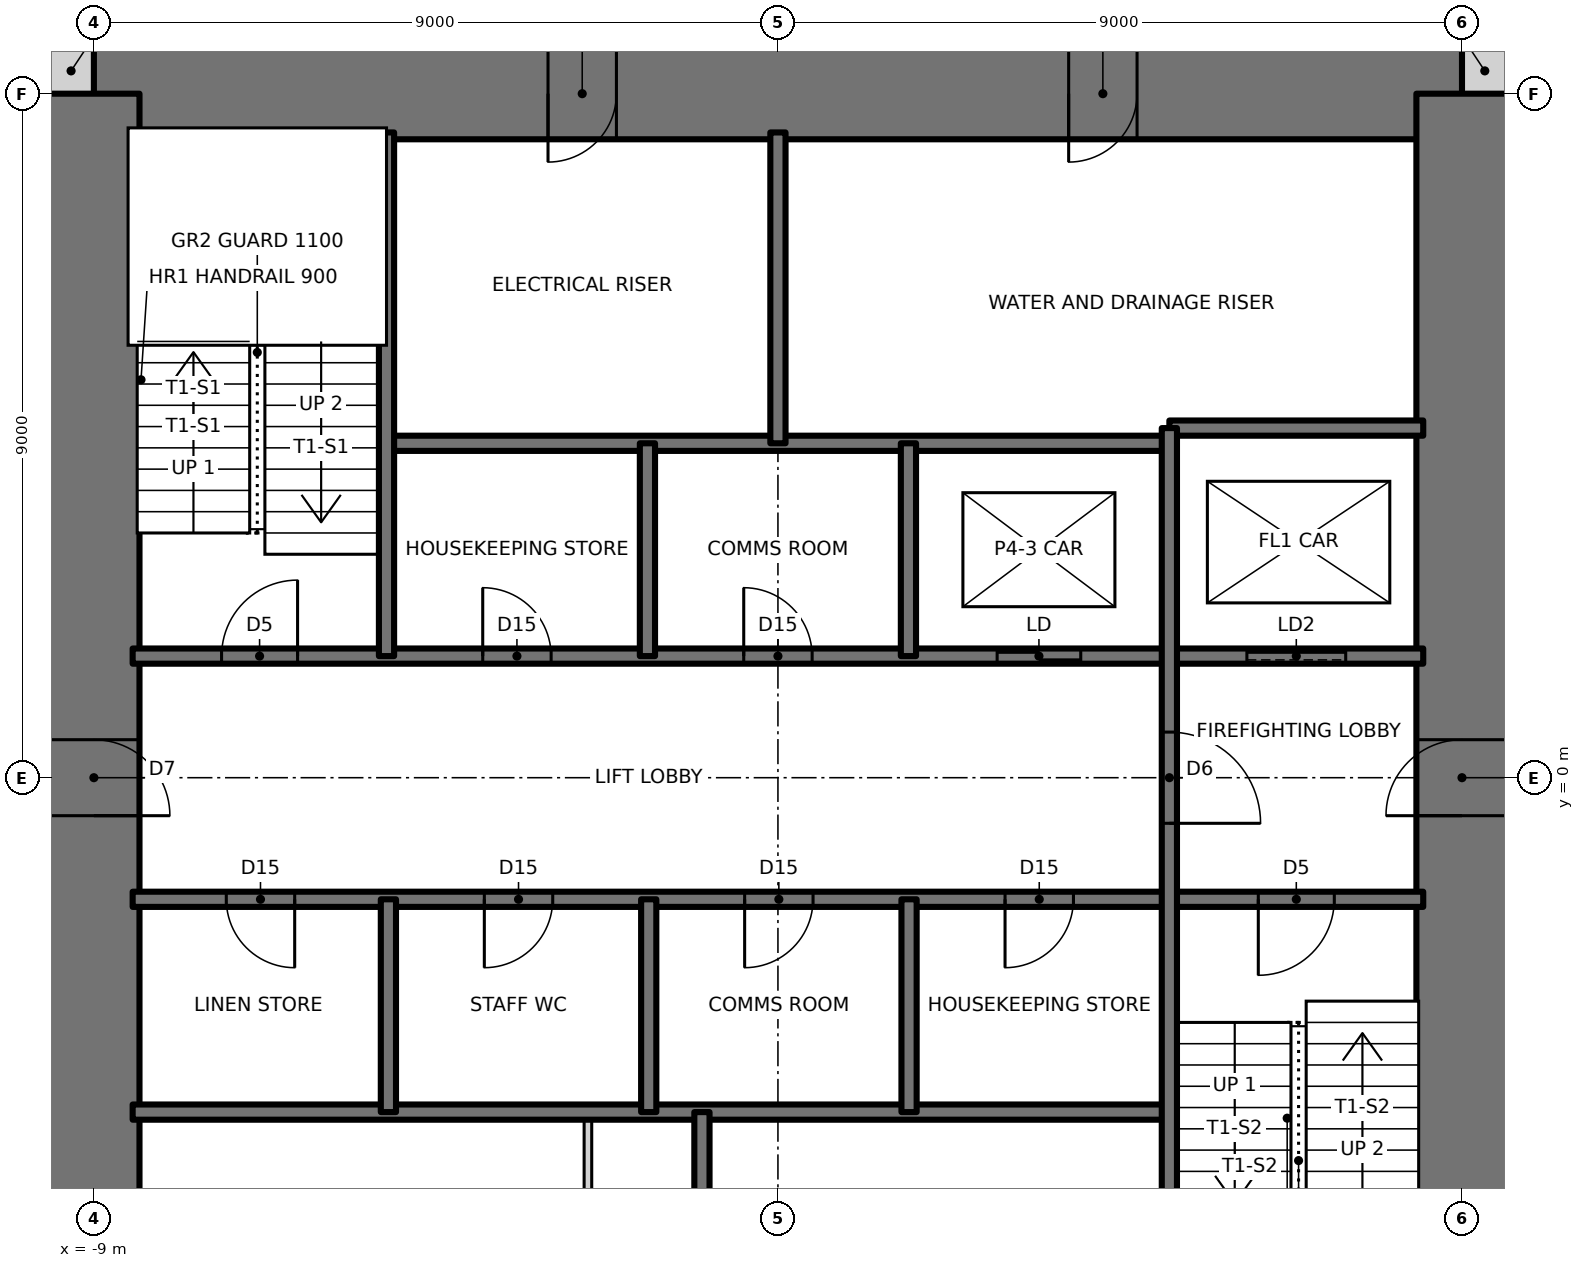
"""IFC4 building model, lengths in metres.
Left out: names, types, materials, properties, quantities, classifications, styles, units other than length and angle.
Written with IfcOpenShell. Run it as: python <this file> out.ifc"""

import sys

from ifc_helpers import new_model, si_unit, direction, frame, frame_2d, origin, place, context, subcontext, project, spatial, rectangle, extrude, element, fill, save


model = new_model("IFC4")
c1 = context("Model", 3, precision=1e-05, world=origin(), true_north=direction((0.0, 1.0)))
c2 = subcontext(c1, "Body", "Model", "MODEL_VIEW")
j1 = project(units=[si_unit("LENGTHUNIT", "METRE"), si_unit("PLANEANGLEUNIT", "RADIAN")], contexts=[c1])
p1 = place(None, origin())
s1 = spatial("IfcSite", under=j1, at=p1, CompositionType="ELEMENT")
p2 = place(p1, origin())
s2 = spatial("IfcBuilding", under=s1, at=p2, CompositionType="ELEMENT")
p3 = place(p2, frame((0.0, 0.0, 222.0)))
s3 = spatial("IfcBuildingStorey", under=s2, at=p3, CompositionType="ELEMENT", Elevation=222.0)
for number, where, z_axis, x_axis in (
    (1, (9.0, 9.3, 0.0), (0.0, 0.0, 1.0), (1.0, 0.0, 0.0)),
    (2, (-9.6, 9.3, 0.0), (0.0, 0.0, 1.0), (1.0, 0.0, 0.0)),
):
    element("IfcWall", number, at=place(p3, frame(where, z_axis=z_axis, x_axis=x_axis)), inside=s3, PredefinedType="SOLIDWALL", context=c2, shape_type="SweptSolid", body=[
        extrude(rectangle(XDim=0.6, YDim=0.6, at=frame_2d((0.3, 0.0))), origin(), (0.0, 0.0, 1.0), 3.5),
    ])
p4 = place(p3, frame((9.0, 9.0, 0.0), z_axis=(0.0, 0.0, 1.0), x_axis=(-1.0, 0.0, 0.0)))
e3 = element("IfcWall", 3, at=p4, inside=s3, PredefinedType="SHEAR", context=c2, shape_type="SweptSolid", body=[
    extrude(rectangle(XDim=18.0, YDim=1.2, at=frame_2d((9.0, 0.0))), origin(), (0.0, 0.0, 1.0), 3.5),
])
p5 = place(p4, frame((11.125, 0.0, 0.0)))
e4 = element("IfcOpeningElement", 4, at=p5, cuts=e3, PredefinedType="OPENING", context=c2, shape_type="SweptSolid", body=[
    extrude(rectangle(XDim=0.9, YDim=2.1, at=frame_2d((0.45, 1.05))), frame((0.0, 0.61, 0.0), z_axis=(0.0, -1.0, 0.0), x_axis=(1.0, 0.0, 0.0)), (0.0, 0.0, 1.0), 1.22),
])
p6 = place(p4, frame((4.275, 0.0, 0.0)))
e5 = element("IfcOpeningElement", 5, at=p6, cuts=e3, PredefinedType="OPENING", context=c2, shape_type="SweptSolid", body=[
    extrude(rectangle(XDim=0.9, YDim=2.1, at=frame_2d((0.45, 1.05))), frame((0.0, 0.61, 0.0), z_axis=(0.0, -1.0, 0.0), x_axis=(1.0, 0.0, 0.0)), (0.0, 0.0, 1.0), 1.22),
])
p7 = place(p3, frame((9.0, -9.0, 0.0), z_axis=(0.0, 0.0, 1.0), x_axis=(0.0, 1.0, 0.0)))
e6 = element("IfcWall", 6, at=p7, inside=s3, PredefinedType="SHEAR", context=c2, shape_type="SweptSolid", body=[
    extrude(rectangle(XDim=18.0, YDim=1.2, at=frame_2d((9.0, 0.0))), origin(), (0.0, 0.0, 1.0), 3.5),
])
p8 = place(p7, frame((8.5, 0.0, 0.0)))
e7 = element("IfcOpeningElement", 7, at=p8, cuts=e6, PredefinedType="OPENING", context=c2, shape_type="SweptSolid", body=[
    extrude(rectangle(XDim=1.0, YDim=2.1, at=frame_2d((0.5, 1.05))), frame((0.0, 0.61, 0.0), z_axis=(0.0, -1.0, 0.0), x_axis=(1.0, 0.0, 0.0)), (0.0, 0.0, 1.0), 1.22),
])
p9 = place(p3, frame((-9.0, 9.0, 0.0), z_axis=(0.0, 0.0, 1.0), x_axis=(0.0, -1.0, 0.0)))
e8 = element("IfcWall", 8, at=p9, inside=s3, PredefinedType="SHEAR", context=c2, shape_type="SweptSolid", body=[
    extrude(rectangle(XDim=18.0, YDim=1.2, at=frame_2d((9.0, 0.0))), origin(), (0.0, 0.0, 1.0), 3.5),
])
p10 = place(p9, frame((8.5, 0.0, 0.0)))
e9 = element("IfcOpeningElement", 9, at=p10, cuts=e8, PredefinedType="OPENING", context=c2, shape_type="SweptSolid", body=[
    extrude(rectangle(XDim=1.0, YDim=2.1, at=frame_2d((0.5, 1.05))), frame((0.0, 0.61, 0.0), z_axis=(0.0, -1.0, 0.0), x_axis=(1.0, 0.0, 0.0)), (0.0, 0.0, 1.0), 1.22),
])
p11 = place(p3, frame((-8.49, -4.4, 0.0), z_axis=(0.0, 0.0, 1.0), x_axis=(1.0, 0.0, 0.0)))
e10 = element("IfcWall", 10, at=p11, inside=s3, PredefinedType="SOLIDWALL", context=c2, shape_type="SweptSolid", body=[
    extrude(rectangle(XDim=13.64, YDim=0.2, at=frame_2d((6.82, 0.0))), origin(), (0.0, 0.0, 1.0), 3.5),
])
p12 = place(p3, frame((-8.49, -1.6, 0.0), z_axis=(0.0, 0.0, 1.0), x_axis=(1.0, 0.0, 0.0)))
e11 = element("IfcWall", 11, at=p12, inside=s3, PredefinedType="SOLIDWALL", context=c2, shape_type="SweptSolid", body=[
    extrude(rectangle(XDim=16.98, YDim=0.2, at=frame_2d((8.49, 0.0))), origin(), (0.0, 0.0, 1.0), 3.5),
])
p13 = place(p12, frame((14.81, 0.0, 0.0)))
e12 = element("IfcOpeningElement", 12, at=p13, cuts=e11, PredefinedType="OPENING", context=c2, shape_type="SweptSolid", body=[
    extrude(rectangle(XDim=1.0, YDim=2.1, at=frame_2d((0.5, 1.05))), frame((0.0, 0.11, 0.0), z_axis=(0.0, -1.0, 0.0), x_axis=(1.0, 0.0, 0.0)), (0.0, 0.0, 1.0), 0.22),
])
p14 = place(p12, frame((1.232, 0.0, 0.0)))
e13 = element("IfcOpeningElement", 13, at=p14, cuts=e11, PredefinedType="OPENING", context=c2, shape_type="SweptSolid", body=[
    extrude(rectangle(XDim=0.9, YDim=2.1, at=frame_2d((0.45, 1.05))), frame((0.0, 0.11, 0.0), z_axis=(0.0, -1.0, 0.0), x_axis=(1.0, 0.0, 0.0)), (0.0, 0.0, 1.0), 0.22),
])
p15 = place(p12, frame((4.627, 0.0, 0.0)))
e14 = element("IfcOpeningElement", 14, at=p15, cuts=e11, PredefinedType="OPENING", context=c2, shape_type="SweptSolid", body=[
    extrude(rectangle(XDim=0.9, YDim=2.1, at=frame_2d((0.45, 1.05))), frame((0.0, 0.11, 0.0), z_axis=(0.0, -1.0, 0.0), x_axis=(1.0, 0.0, 0.0)), (0.0, 0.0, 1.0), 0.22),
])
p16 = place(p12, frame((8.052, 0.0, 0.0)))
e15 = element("IfcOpeningElement", 15, at=p16, cuts=e11, PredefinedType="OPENING", context=c2, shape_type="SweptSolid", body=[
    extrude(rectangle(XDim=0.9, YDim=2.1, at=frame_2d((0.45, 1.05))), frame((0.0, 0.11, 0.0), z_axis=(0.0, -1.0, 0.0), x_axis=(1.0, 0.0, 0.0)), (0.0, 0.0, 1.0), 0.22),
])
p17 = place(p12, frame((11.478, 0.0, 0.0)))
e16 = element("IfcOpeningElement", 16, at=p17, cuts=e11, PredefinedType="OPENING", context=c2, shape_type="SweptSolid", body=[
    extrude(rectangle(XDim=0.9, YDim=2.1, at=frame_2d((0.45, 1.05))), frame((0.0, 0.11, 0.0), z_axis=(0.0, -1.0, 0.0), x_axis=(1.0, 0.0, 0.0)), (0.0, 0.0, 1.0), 0.22),
])
p18 = place(p3, frame((-8.49, 1.6, 0.0), z_axis=(0.0, 0.0, 1.0), x_axis=(1.0, 0.0, 0.0)))
e17 = element("IfcWall", 17, at=p18, inside=s3, PredefinedType="SOLIDWALL", context=c2, shape_type="SweptSolid", body=[
    extrude(rectangle(XDim=16.98, YDim=0.2, at=frame_2d((8.49, 0.0))), origin(), (0.0, 0.0, 1.0), 3.5),
])
p19 = place(p18, frame((1.17, 0.0, 0.0)))
e18 = element("IfcOpeningElement", 18, at=p19, cuts=e17, PredefinedType="OPENING", context=c2, shape_type="SweptSolid", body=[
    extrude(rectangle(XDim=1.0, YDim=2.1, at=frame_2d((0.5, 1.05))), frame((0.0, 0.11, 0.0), z_axis=(0.0, -1.0, 0.0), x_axis=(1.0, 0.0, 0.0)), (0.0, 0.0, 1.0), 0.22),
])
p20 = place(p18, frame((4.606, 0.0, 0.0)))
e19 = element("IfcOpeningElement", 19, at=p20, cuts=e17, PredefinedType="OPENING", context=c2, shape_type="SweptSolid", body=[
    extrude(rectangle(XDim=0.9, YDim=2.1, at=frame_2d((0.45, 1.05))), frame((0.0, 0.11, 0.0), z_axis=(0.0, -1.0, 0.0), x_axis=(1.0, 0.0, 0.0)), (0.0, 0.0, 1.0), 0.22),
])
p21 = place(p18, frame((8.04, 0.0, 0.0)))
e20 = element("IfcOpeningElement", 20, at=p21, cuts=e17, PredefinedType="OPENING", context=c2, shape_type="SweptSolid", body=[
    extrude(rectangle(XDim=0.9, YDim=2.1, at=frame_2d((0.45, 1.05))), frame((0.0, 0.11, 0.0), z_axis=(0.0, -1.0, 0.0), x_axis=(1.0, 0.0, 0.0)), (0.0, 0.0, 1.0), 0.22),
])
p22 = place(p18, frame((11.374, 0.0, 0.0)))
e21 = element("IfcOpeningElement", 21, at=p22, cuts=e17, PredefinedType="OPENING", context=c2, shape_type="SweptSolid", body=[
    extrude(rectangle(XDim=1.1, YDim=2.1, at=frame_2d((0.55, 1.05))), frame((0.0, 0.11, 0.0), z_axis=(0.0, -1.0, 0.0), x_axis=(1.0, 0.0, 0.0)), (0.0, 0.0, 1.0), 0.22),
])
p23 = place(p18, frame((14.66, 0.0, 0.0)))
e22 = element("IfcOpeningElement", 22, at=p23, cuts=e17, PredefinedType="OPENING", context=c2, shape_type="SweptSolid", body=[
    extrude(rectangle(XDim=1.3, YDim=2.1, at=frame_2d((0.65, 1.05))), frame((0.0, 0.11, 0.0), z_axis=(0.0, -1.0, 0.0), x_axis=(1.0, 0.0, 0.0)), (0.0, 0.0, 1.0), 0.22),
])
p24 = place(p3, frame((-5.15, 4.4, 0.0), z_axis=(0.0, 0.0, 1.0), x_axis=(1.0, 0.0, 0.0)))
e23 = element("IfcWall", 23, at=p24, inside=s3, PredefinedType="SOLIDWALL", context=c2, shape_type="SweptSolid", body=[
    extrude(rectangle(XDim=10.3, YDim=0.2, at=frame_2d((5.15, 0.0))), origin(), (0.0, 0.0, 1.0), 3.5),
])
p25 = place(p3, frame((5.15, 4.6, 0.0), z_axis=(0.0, 0.0, 1.0), x_axis=(1.0, 0.0, 0.0)))
e24 = element("IfcWall", 24, at=p25, inside=s3, PredefinedType="SOLIDWALL", context=c2, shape_type="SweptSolid", body=[
    extrude(rectangle(XDim=3.34, YDim=0.2, at=frame_2d((1.67, 0.0))), origin(), (0.0, 0.0, 1.0), 3.5),
])
p26 = place(p3, frame((5.15, -8.49, 0.0), z_axis=(0.0, 0.0, 1.0), x_axis=(0.0, 1.0, 0.0)))
e25 = element("IfcWall", 25, at=p26, inside=s3, PredefinedType="SOLIDWALL", context=c2, shape_type="SweptSolid", body=[
    extrude(rectangle(XDim=13.09, YDim=0.2, at=frame_2d((6.545, 0.0))), origin(), (0.0, 0.0, 1.0), 3.5),
])
p27 = place(p26, frame((7.89, 0.0, 0.0)))
e26 = element("IfcOpeningElement", 26, at=p27, cuts=e25, PredefinedType="OPENING", context=c2, shape_type="SweptSolid", body=[
    extrude(rectangle(XDim=1.2, YDim=2.1, at=frame_2d((0.6, 1.05))), frame((0.0, 0.11, 0.0), z_axis=(0.0, -1.0, 0.0), x_axis=(1.0, 0.0, 0.0)), (0.0, 0.0, 1.0), 0.22),
])
for number, where, z_axis, x_axis in (
    (27, (1.725, -4.4, 0.0), (0.0, 0.0, 1.0), (0.0, 1.0, 0.0)),
    (28, (1.717, 1.6, 0.0), (0.0, 0.0, 1.0), (0.0, 1.0, 0.0)),
):
    element("IfcWall", number, at=place(p3, frame(where, z_axis=z_axis, x_axis=x_axis)), inside=s3, PredefinedType="SOLIDWALL", context=c2, shape_type="SweptSolid", body=[
        extrude(rectangle(XDim=2.8, YDim=0.2, at=frame_2d((1.4, 0.0))), origin(), (0.0, 0.0, 1.0), 3.5),
    ])
for number, where, z_axis, x_axis in (
    (29, (0.0, 4.4, 0.0), (0.0, 0.0, 1.0), (0.0, 1.0, 0.0)),
    (30, (-1.0, -8.49, 0.0), (0.0, 0.0, 1.0), (0.0, 1.0, 0.0)),
):
    element("IfcWall", number, at=place(p3, frame(where, z_axis=z_axis, x_axis=x_axis)), inside=s3, PredefinedType="SOLIDWALL", context=c2, shape_type="SweptSolid", body=[
        extrude(rectangle(XDim=4.09, YDim=0.2, at=frame_2d((2.045, 0.0))), origin(), (0.0, 0.0, 1.0), 3.5),
    ])
for number, where, z_axis, x_axis in (
    (31, (-1.7, -4.4, 0.0), (0.0, 0.0, 1.0), (0.0, 1.0, 0.0)),
    (32, (-1.717, 1.6, 0.0), (0.0, 0.0, 1.0), (0.0, 1.0, 0.0)),
):
    element("IfcWall", number, at=place(p3, frame(where, z_axis=z_axis, x_axis=x_axis)), inside=s3, PredefinedType="SOLIDWALL", context=c2, shape_type="SweptSolid", body=[
        extrude(rectangle(XDim=2.8, YDim=0.2, at=frame_2d((1.4, 0.0))), origin(), (0.0, 0.0, 1.0), 3.5),
    ])
p28 = place(p3, frame((-2.5, -8.49, 0.0), z_axis=(0.0, 0.0, 1.0), x_axis=(0.0, 1.0, 0.0)))
e33 = element("IfcWall", 33, at=p28, inside=s3, PredefinedType="PARTITIONING", context=c2, shape_type="SweptSolid", body=[
    extrude(rectangle(XDim=4.09, YDim=0.1, at=frame_2d((2.045, 0.0))), origin(), (0.0, 0.0, 1.0), 3.3),
])
p29 = place(p28, frame((1.595, 0.0, 0.0)))
e34 = element("IfcOpeningElement", 34, at=p29, cuts=e33, PredefinedType="OPENING", context=c2, shape_type="SweptSolid", body=[
    extrude(rectangle(XDim=0.9, YDim=2.1, at=frame_2d((0.45, 1.05))), frame((0.0, 0.06, 0.0), z_axis=(0.0, -1.0, 0.0), x_axis=(1.0, 0.0, 0.0)), (0.0, 0.0, 1.0), 0.12),
])
p30 = place(p3, frame((-5.125, -4.4, 0.0), z_axis=(0.0, 0.0, 1.0), x_axis=(0.0, 1.0, 0.0)))
e35 = element("IfcWall", 35, at=p30, inside=s3, PredefinedType="SOLIDWALL", context=c2, shape_type="SweptSolid", body=[
    extrude(rectangle(XDim=2.8, YDim=0.2, at=frame_2d((1.4, 0.0))), origin(), (0.0, 0.0, 1.0), 3.5),
])
p31 = place(p3, frame((-5.15, 1.6, 0.0), z_axis=(0.0, 0.0, 1.0), x_axis=(0.0, 1.0, 0.0)))
e36 = element("IfcWall", 36, at=p31, inside=s3, PredefinedType="SOLIDWALL", context=c2, shape_type="SweptSolid", body=[
    extrude(rectangle(XDim=6.89, YDim=0.2, at=frame_2d((3.445, 0.0))), origin(), (0.0, 0.0, 1.0), 3.5),
])
p32 = place(p19, origin())
e37 = element("IfcDoor", 37, at=p32, inside=s3, OperationType="SINGLE_SWING_RIGHT", PredefinedType="DOOR", context=c2, shape_type="SweptSolid", body=[
    extrude(rectangle(XDim=1.0, YDim=2.1, at=frame_2d((0.5, 1.05))), frame((0.0, 0.025, 0.0), z_axis=(0.0, -1.0, 0.0), x_axis=(1.0, 0.0, 0.0)), (0.0, 0.0, 1.0), 0.05),
])
fill(e18, e37)
p33 = place(p13, frame((1.0, 0.0, 0.0), z_axis=(0.0, 0.0, 1.0), x_axis=(-1.0, 0.0, 0.0)))
e38 = element("IfcDoor", 38, at=p33, inside=s3, OperationType="SINGLE_SWING_RIGHT", PredefinedType="DOOR", context=c2, shape_type="SweptSolid", body=[
    extrude(rectangle(XDim=1.0, YDim=2.1, at=frame_2d((0.5, 1.05))), frame((0.0, 0.025, 0.0), z_axis=(0.0, -1.0, 0.0), x_axis=(1.0, 0.0, 0.0)), (0.0, 0.0, 1.0), 0.05),
])
fill(e12, e38)
p34 = place(p27, frame((1.2, 0.0, 0.0), z_axis=(0.0, 0.0, 1.0), x_axis=(-1.0, 0.0, 0.0)))
e39 = element("IfcDoor", 39, at=p34, inside=s3, OperationType="SINGLE_SWING_RIGHT", PredefinedType="DOOR", context=c2, shape_type="SweptSolid", body=[
    extrude(rectangle(XDim=1.2, YDim=2.1, at=frame_2d((0.6, 1.05))), frame((0.0, 0.025, 0.0), z_axis=(0.0, -1.0, 0.0), x_axis=(1.0, 0.0, 0.0)), (0.0, 0.0, 1.0), 0.05),
])
fill(e26, e39)
p35 = place(p20, origin())
e40 = element("IfcDoor", 40, at=p35, inside=s3, OperationType="SINGLE_SWING_LEFT", PredefinedType="DOOR", context=c2, shape_type="SweptSolid", body=[
    extrude(rectangle(XDim=0.9, YDim=2.1, at=frame_2d((0.45, 1.05))), frame((0.0, 0.025, 0.0), z_axis=(0.0, -1.0, 0.0), x_axis=(1.0, 0.0, 0.0)), (0.0, 0.0, 1.0), 0.05),
])
fill(e19, e40)
p36 = place(p21, origin())
e41 = element("IfcDoor", 41, at=p36, inside=s3, OperationType="SINGLE_SWING_LEFT", PredefinedType="DOOR", context=c2, shape_type="SweptSolid", body=[
    extrude(rectangle(XDim=0.9, YDim=2.1, at=frame_2d((0.45, 1.05))), frame((0.0, 0.025, 0.0), z_axis=(0.0, -1.0, 0.0), x_axis=(1.0, 0.0, 0.0)), (0.0, 0.0, 1.0), 0.05),
])
fill(e20, e41)
p37 = place(p14, frame((0.9, 0.0, 0.0), z_axis=(0.0, 0.0, 1.0), x_axis=(-1.0, 0.0, 0.0)))
e42 = element("IfcDoor", 42, at=p37, inside=s3, OperationType="SINGLE_SWING_LEFT", PredefinedType="DOOR", context=c2, shape_type="SweptSolid", body=[
    extrude(rectangle(XDim=0.9, YDim=2.1, at=frame_2d((0.45, 1.05))), frame((0.0, 0.025, 0.0), z_axis=(0.0, -1.0, 0.0), x_axis=(1.0, 0.0, 0.0)), (0.0, 0.0, 1.0), 0.05),
])
fill(e13, e42)
p38 = place(p15, frame((0.9, 0.0, 0.0), z_axis=(0.0, 0.0, 1.0), x_axis=(-1.0, 0.0, 0.0)))
e43 = element("IfcDoor", 43, at=p38, inside=s3, OperationType="SINGLE_SWING_RIGHT", PredefinedType="DOOR", context=c2, shape_type="SweptSolid", body=[
    extrude(rectangle(XDim=0.9, YDim=2.1, at=frame_2d((0.45, 1.05))), frame((0.0, 0.025, 0.0), z_axis=(0.0, -1.0, 0.0), x_axis=(1.0, 0.0, 0.0)), (0.0, 0.0, 1.0), 0.05),
])
fill(e14, e43)
p39 = place(p16, frame((0.9, 0.0, 0.0), z_axis=(0.0, 0.0, 1.0), x_axis=(-1.0, 0.0, 0.0)))
e44 = element("IfcDoor", 44, at=p39, inside=s3, OperationType="SINGLE_SWING_RIGHT", PredefinedType="DOOR", context=c2, shape_type="SweptSolid", body=[
    extrude(rectangle(XDim=0.9, YDim=2.1, at=frame_2d((0.45, 1.05))), frame((0.0, 0.025, 0.0), z_axis=(0.0, -1.0, 0.0), x_axis=(1.0, 0.0, 0.0)), (0.0, 0.0, 1.0), 0.05),
])
fill(e15, e44)
p40 = place(p17, frame((0.9, 0.0, 0.0), z_axis=(0.0, 0.0, 1.0), x_axis=(-1.0, 0.0, 0.0)))
e45 = element("IfcDoor", 45, at=p40, inside=s3, OperationType="SINGLE_SWING_RIGHT", PredefinedType="DOOR", context=c2, shape_type="SweptSolid", body=[
    extrude(rectangle(XDim=0.9, YDim=2.1, at=frame_2d((0.45, 1.05))), frame((0.0, 0.025, 0.0), z_axis=(0.0, -1.0, 0.0), x_axis=(1.0, 0.0, 0.0)), (0.0, 0.0, 1.0), 0.05),
])
fill(e16, e45)
p41 = place(p10, origin())
e46 = element("IfcDoor", 46, at=p41, inside=s3, OperationType="SINGLE_SWING_RIGHT", PredefinedType="DOOR", context=c2, shape_type="SweptSolid", body=[
    extrude(rectangle(XDim=1.0, YDim=2.1, at=frame_2d((0.5, 1.05))), frame((0.0, 0.025, 0.0), z_axis=(0.0, -1.0, 0.0), x_axis=(1.0, 0.0, 0.0)), (0.0, 0.0, 1.0), 0.05),
])
fill(e9, e46)
p42 = place(p8, origin())
e47 = element("IfcDoor", 47, at=p42, inside=s3, OperationType="SINGLE_SWING_LEFT", PredefinedType="DOOR", context=c2, shape_type="SweptSolid", body=[
    extrude(rectangle(XDim=1.0, YDim=2.1, at=frame_2d((0.5, 1.05))), frame((0.0, 0.025, 0.0), z_axis=(0.0, -1.0, 0.0), x_axis=(1.0, 0.0, 0.0)), (0.0, 0.0, 1.0), 0.05),
])
fill(e7, e47)
p43 = place(p5, origin())
e48 = element("IfcDoor", 48, at=p43, inside=s3, OperationType="SINGLE_SWING_RIGHT", PredefinedType="DOOR", context=c2, shape_type="SweptSolid", body=[
    extrude(rectangle(XDim=0.9, YDim=2.1, at=frame_2d((0.45, 1.05))), frame((0.0, 0.025, 0.0), z_axis=(0.0, -1.0, 0.0), x_axis=(1.0, 0.0, 0.0)), (0.0, 0.0, 1.0), 0.05),
])
fill(e4, e48)
p44 = place(p6, origin())
e49 = element("IfcDoor", 49, at=p44, inside=s3, OperationType="SINGLE_SWING_RIGHT", PredefinedType="DOOR", context=c2, shape_type="SweptSolid", body=[
    extrude(rectangle(XDim=0.9, YDim=2.1, at=frame_2d((0.45, 1.05))), frame((0.0, 0.025, 0.0), z_axis=(0.0, -1.0, 0.0), x_axis=(1.0, 0.0, 0.0)), (0.0, 0.0, 1.0), 0.05),
])
fill(e5, e49)
p45 = place(p22, origin())
e50 = element("IfcDoor", 50, at=p45, inside=s3, OperationType="DOUBLE_DOOR_SLIDING", PredefinedType="DOOR", context=c2, shape_type="SweptSolid", body=[
    extrude(rectangle(XDim=1.1, YDim=2.1, at=frame_2d((0.55, 1.05))), frame((0.0, 0.025, 0.0), z_axis=(0.0, -1.0, 0.0), x_axis=(1.0, 0.0, 0.0)), (0.0, 0.0, 1.0), 0.05),
])
fill(e21, e50)
p46 = place(p23, origin())
e51 = element("IfcDoor", 51, at=p46, inside=s3, OperationType="SLIDING_TO_LEFT", PredefinedType="DOOR", context=c2, shape_type="SweptSolid", body=[
    extrude(rectangle(XDim=1.3, YDim=2.1, at=frame_2d((0.65, 1.05))), frame((0.0, 0.025, 0.0), z_axis=(0.0, -1.0, 0.0), x_axis=(1.0, 0.0, 0.0)), (0.0, 0.0, 1.0), 0.05),
])
fill(e22, e51)
save(model, sys.argv[1])
